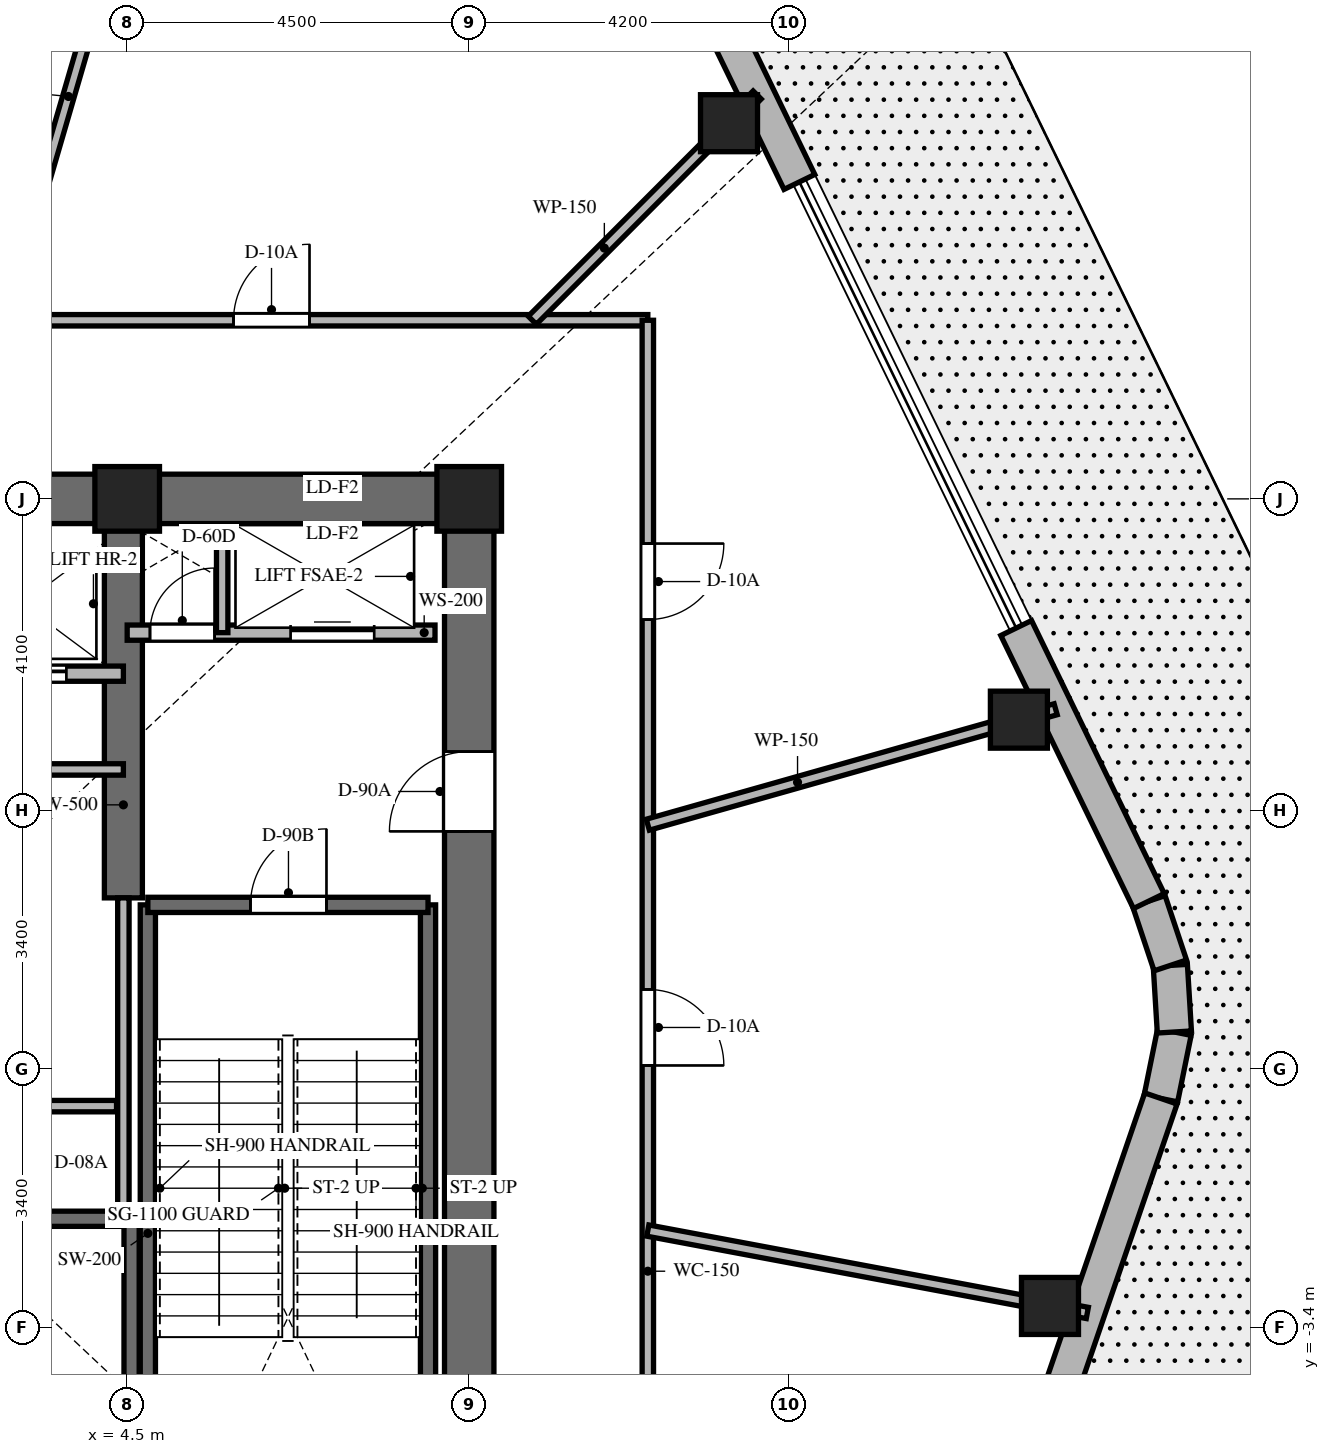
"""IFC4 building model, lengths in metres.
Left out: names, types, materials, properties, quantities, classifications, styles, units other than length and angle.
Written with IfcOpenShell. Run it as: python <this file> out.ifc"""

import sys

from ifc_helpers import new_model, si_unit, direction, frame, frame_2d, origin, origin_2d, place, context, subcontext, project, spatial, rectangle, extrude, element, fill, save


model = new_model("IFC4")
c1 = context("Model", 3, precision=1e-05, world=origin(), true_north=direction((0.0, 1.0)))
c2 = subcontext(c1, "Body", "Model", "MODEL_VIEW")
j1 = project(units=[si_unit("LENGTHUNIT", "METRE"), si_unit("PLANEANGLEUNIT", "RADIAN")], contexts=[c1])
p1 = place(None, origin())
s1 = spatial("IfcSite", under=j1, at=p1, CompositionType="ELEMENT")
p2 = place(p1, origin())
s2 = spatial("IfcBuilding", under=s1, at=p2, CompositionType="ELEMENT")
p3 = place(p2, frame((0.0, 0.0, 305.4)))
s3 = spatial("IfcBuildingStorey", under=s2, at=p3, CompositionType="ELEMENT", Elevation=305.4)
p4 = place(p3, frame((1.85, 7.5, 0.0), z_axis=(0.0, 0.0, 1.0), x_axis=(1.0, 0.0, 0.0)))
e1 = element("IfcWall", 1, at=p4, inside=s3, PredefinedType="SHEAR", context=c2, shape_type="SweptSolid", body=[
    extrude(rectangle(XDim=7.475, YDim=0.65, at=frame_2d((3.737, 0.0))), origin(), (0.0, 0.0, 1.0), 5.0),
])
p5 = place(p3, frame((9.0, -7.175, 0.0), z_axis=(0.0, 0.0, 1.0), x_axis=(0.0, 1.0, 0.0)))
e2 = element("IfcWall", 2, at=p5, inside=s3, PredefinedType="SHEAR", context=c2, shape_type="SweptSolid", body=[
    extrude(rectangle(XDim=14.35, YDim=0.65, at=frame_2d((7.175, 0.0))), origin(), (0.0, 0.0, 1.0), 5.0),
])
p6 = place(p5, frame((10.3, 0.0, 0.0)))
e3 = element("IfcOpeningElement", 3, at=p6, cuts=e2, PredefinedType="OPENING", context=c2, shape_type="SweptSolid", body=[
    extrude(rectangle(XDim=1.05, YDim=2.15, at=frame_2d((0.525, 1.075))), frame((0.0, 0.335, 0.0), z_axis=(0.0, -1.0, 0.0), x_axis=(1.0, 0.0, 0.0)), (0.0, 0.0, 1.0), 0.67),
])
p7 = place(p3, frame((4.45, 2.25, 0.0), z_axis=(0.0, 0.0, 1.0), x_axis=(0.0, 1.0, 0.0)))
e4 = element("IfcWall", 4, at=p7, inside=s3, PredefinedType="SHEAR", context=c2, shape_type="SweptSolid", body=[
    extrude(rectangle(XDim=4.925, YDim=0.5, at=frame_2d((2.462, 0.0))), origin(), (0.0, 0.0, 1.0), 5.0),
])
for number, where, z_axis, x_axis in (
    (5, (4.772, -6.985, 0.0), (0.0, 0.0, 1.0), (0.0, 1.0, 0.0)),
    (6, (8.458, -6.985, 0.0), (0.0, 0.0, 1.0), (0.0, 1.0, 0.0)),
):
    element("IfcWall", number, at=place(p3, frame(where, z_axis=z_axis, x_axis=x_axis)), inside=s3, PredefinedType="SHEAR", context=c2, shape_type="SweptSolid", body=[
        extrude(rectangle(XDim=9.143, YDim=0.2, at=frame_2d((4.572, 0.0))), origin(), (0.0, 0.0, 1.0), 5.0),
    ])
p8 = place(p3, frame((4.772, 2.158, 0.0), z_axis=(0.0, 0.0, 1.0), x_axis=(1.0, 0.0, 0.0)))
e7 = element("IfcWall", 7, at=p8, inside=s3, PredefinedType="SHEAR", context=c2, shape_type="SweptSolid", body=[
    extrude(rectangle(XDim=3.686, YDim=0.2, at=frame_2d((1.843, 0.0))), origin(), (0.0, 0.0, 1.0), 5.0),
])
p9 = place(p8, frame((1.35, 0.0, 0.0)))
e8 = element("IfcOpeningElement", 8, at=p9, cuts=e7, PredefinedType="OPENING", context=c2, shape_type="SweptSolid", body=[
    extrude(rectangle(XDim=1.0, YDim=2.15, at=frame_2d((0.5, 1.075))), frame((0.0, 0.11, 0.0), z_axis=(0.0, -1.0, 0.0), x_axis=(1.0, 0.0, 0.0)), (0.0, 0.0, 1.0), 0.22),
])
p10 = place(p3, frame((-4.608, -1.972, 0.0), z_axis=(0.0, 0.0, 1.0), x_axis=(1.0, 0.0, 0.0)))
e9 = element("IfcWall", 9, at=p10, inside=s3, PredefinedType="SHEAR", context=c2, shape_type="SweptSolid", body=[
    extrude(rectangle(XDim=9.166, YDim=0.2, at=frame_2d((4.583, 0.0))), origin(), (0.0, 0.0, 1.0), 5.0),
])
p11 = place(p3, frame((4.558, -5.658, 0.0), z_axis=(0.0, 0.0, 1.0), x_axis=(0.0, 1.0, 0.0)))
e10 = element("IfcWall", 10, at=p11, inside=s3, PredefinedType="SHEAR", context=c2, shape_type="SweptSolid", body=[
    extrude(rectangle(XDim=3.686, YDim=0.2, at=frame_2d((1.843, 0.0))), origin(), (0.0, 0.0, 1.0), 5.0),
])
for number, where, z_axis, x_axis in (
    (11, (9.0, 7.5, 0.0), (0.0, 0.0, 1.0), (1.0, 0.0, 0.0)),
    (12, (4.5, 7.5, 0.0), (0.0, 0.0, 1.0), (1.0, 0.0, 0.0)),
):
    element("IfcColumn", number, at=place(p3, frame(where, z_axis=z_axis, x_axis=x_axis)), inside=s3, PredefinedType="COLUMN", context=c2, shape_type="SweptSolid", body=[
        extrude(rectangle(XDim=0.85, YDim=0.85, at=origin_2d()), origin(), (0.0, 0.0, 1.0), 5.0),
    ])
for number, where, z_axis, x_axis in (
    (13, (16.641, -3.119, 0.0), (0.0, 0.0, 1.0), (1.0, 0.0, 0.0)),
    (14, (16.232, 4.595, 0.0), (0.0, 0.0, 1.0), (1.0, 0.0, 0.0)),
    (15, (12.418, 12.443, 0.0), (0.0, 0.0, 1.0), (1.0, 0.0, 0.0)),
):
    element("IfcColumn", number, at=place(p3, frame(where, z_axis=z_axis, x_axis=x_axis)), inside=s3, PredefinedType="COLUMN", context=c2, shape_type="SweptSolid", body=[
        extrude(rectangle(XDim=0.75, YDim=0.75, at=origin_2d()), origin(), (0.0, 0.0, 1.0), 5.0),
    ])
p12 = place(p3, frame((18.1, -0.389, 0.0), z_axis=(0.0, 0.0, 1.0), x_axis=(0.198587865476, 0.980083088154, 0.0)))
e16 = element("IfcWall", 16, at=p12, inside=s3, PredefinedType="SOLIDWALL", context=c2, shape_type="SweptSolid", body=[
    extrude(rectangle(XDim=0.893, YDim=0.45, at=frame_2d((0.446, 0.0))), origin(), (0.0, 0.0, 1.0), 4.68),
])
p13 = place(p3, frame((18.278, 0.486, 0.0), z_axis=(0.0, 0.0, 1.0), x_axis=(-0.060923410031, 0.998142443798, 0.0)))
e17 = element("IfcWall", 17, at=p13, inside=s3, PredefinedType="SOLIDWALL", context=c2, shape_type="SweptSolid", body=[
    extrude(rectangle(XDim=0.878, YDim=0.45, at=frame_2d((0.439, 0.0))), origin(), (0.0, 0.0, 1.0), 4.68),
])
p14 = place(p3, frame((18.224, 1.362, 0.0), z_axis=(0.0, 0.0, 1.0), x_axis=(-0.316227766017, 0.948683298051, 0.0)))
e18 = element("IfcWall", 18, at=p14, inside=s3, PredefinedType="SOLIDWALL", context=c2, shape_type="SweptSolid", body=[
    extrude(rectangle(XDim=0.893, YDim=0.45, at=frame_2d((0.446, 0.0))), origin(), (0.0, 0.0, 1.0), 4.68),
])
p15 = place(p3, frame((16.752, -4.32, 0.0), z_axis=(0.0, 0.0, 1.0), x_axis=(0.324516563827, 0.945880013428, 0.0)))
e19 = element("IfcWall", 19, at=p15, inside=s3, PredefinedType="SOLIDWALL", context=c2, shape_type="SweptSolid", body=[
    extrude(rectangle(XDim=4.156, YDim=0.45, at=frame_2d((2.078, 0.0))), origin(), (0.0, 0.0, 1.0), 4.68),
])
p16 = place(p3, frame((17.942, 2.208, 0.0), z_axis=(0.0, 0.0, 1.0), x_axis=(-0.437062225544, 0.899431270861, 0.0)))
e20 = element("IfcWall", 20, at=p16, inside=s3, PredefinedType="SOLIDWALL", context=c2, shape_type="SweptSolid", body=[
    extrude(rectangle(XDim=3.994, YDim=0.45, at=frame_2d((1.997, 0.0))), origin(), (0.0, 0.0, 1.0), 4.68),
])
p17 = place(p3, frame((13.344, 11.67, 0.0), z_axis=(0.0, 0.0, 1.0), x_axis=(-0.437044105444, 0.899440075768, 0.0)))
e21 = element("IfcWall", 21, at=p17, inside=s3, PredefinedType="SOLIDWALL", context=c2, shape_type="SweptSolid", body=[
    extrude(rectangle(XDim=3.987, YDim=0.45, at=frame_2d((1.993, 0.0))), origin(), (0.0, 0.0, 1.0), 4.68),
])
p18 = place(p3, frame((4.5, 5.74, 0.0), z_axis=(0.0, 0.0, 1.0), x_axis=(1.0, 0.0, 0.0)))
e22 = element("IfcWall", 22, at=p18, inside=s3, PredefinedType="PARTITIONING", context=c2, shape_type="SweptSolid", body=[
    extrude(rectangle(XDim=4.05, YDim=0.2, at=frame_2d((2.025, 0.0))), origin(), (0.0, 0.0, 1.0), 4.68),
])
p19 = place(p18, frame((0.3, 0.0, 0.0)))
e23 = element("IfcOpeningElement", 23, at=p19, cuts=e22, PredefinedType="OPENING", context=c2, shape_type="SweptSolid", body=[
    extrude(rectangle(XDim=0.85, YDim=2.03, at=frame_2d((0.425, 1.015))), frame((0.0, 0.11, 0.0), z_axis=(0.0, -1.0, 0.0), x_axis=(1.0, 0.0, 0.0)), (0.0, 0.0, 1.0), 0.22),
])
p20 = place(p18, frame((2.15, 0.0, 0.0)))
e24 = element("IfcOpeningElement", 24, at=p20, cuts=e22, PredefinedType="OPENING", context=c2, shape_type="SweptSolid", body=[
    extrude(rectangle(XDim=1.1, YDim=2.2, at=frame_2d((0.55, 1.1))), frame((0.0, 0.11, 0.0), z_axis=(0.0, -1.0, 0.0), x_axis=(1.0, 0.0, 0.0)), (0.0, 0.0, 1.0), 0.22),
])
p21 = place(p3, frame((5.75, 5.74, 0.0), z_axis=(0.0, 0.0, 1.0), x_axis=(0.0, 1.0, 0.0)))
e25 = element("IfcWall", 25, at=p21, inside=s3, PredefinedType="PARTITIONING", context=c2, shape_type="SweptSolid", body=[
    extrude(rectangle(XDim=1.41, YDim=0.15, at=frame_2d((0.705, 0.0))), origin(), (0.0, 0.0, 1.0), 4.68),
])
p22 = place(p3, frame((1.85, 5.2, 0.0), z_axis=(0.0, 0.0, 1.0), x_axis=(1.0, 0.0, 0.0)))
e26 = element("IfcWall", 26, at=p22, inside=s3, PredefinedType="PARTITIONING", context=c2, shape_type="SweptSolid", body=[
    extrude(rectangle(XDim=2.6, YDim=0.2, at=frame_2d((1.3, 0.0))), origin(), (0.0, 0.0, 1.0), 4.68),
])
p23 = place(p22, frame((0.75, 0.0, 0.0)))
e27 = element("IfcOpeningElement", 27, at=p23, cuts=e26, PredefinedType="OPENING", context=c2, shape_type="SweptSolid", body=[
    extrude(rectangle(XDim=1.1, YDim=2.2, at=frame_2d((0.55, 1.1))), frame((0.0, 0.11, 0.0), z_axis=(0.0, -1.0, 0.0), x_axis=(1.0, 0.0, 0.0)), (0.0, 0.0, 1.0), 0.22),
])
p24 = place(p3, frame((4.45, -1.972, 0.0), z_axis=(0.0, 0.0, 1.0), x_axis=(0.0, 1.0, 0.0)))
e28 = element("IfcWall", 28, at=p24, inside=s3, PredefinedType="PARTITIONING", context=c2, shape_type="SweptSolid", body=[
    extrude(rectangle(XDim=4.222, YDim=0.15, at=frame_2d((2.111, 0.0))), origin(), (0.0, 0.0, 1.0), 4.68),
])
p25 = place(p3, frame((1.9, 3.94, 0.0), z_axis=(0.0, 0.0, 1.0), x_axis=(1.0, 0.0, 0.0)))
e29 = element("IfcWall", 29, at=p25, inside=s3, PredefinedType="PARTITIONING", context=c2, shape_type="SweptSolid", body=[
    extrude(rectangle(XDim=2.55, YDim=0.15, at=frame_2d((1.275, 0.0))), origin(), (0.0, 0.0, 1.0), 4.68),
])
p26 = place(p3, frame((-4.36, -0.49, 0.0), z_axis=(0.0, 0.0, 1.0), x_axis=(1.0, 0.0, 0.0)))
e30 = element("IfcWall", 30, at=p26, inside=s3, PredefinedType="PARTITIONING", context=c2, shape_type="SweptSolid", body=[
    extrude(rectangle(XDim=8.72, YDim=0.15, at=frame_2d((4.36, 0.0))), origin(), (0.0, 0.0, 1.0), 4.68),
])
p27 = place(p26, frame((2.81, 0.0, 0.0)))
e31 = element("IfcOpeningElement", 31, at=p27, cuts=e30, PredefinedType="OPENING", context=c2, shape_type="SweptSolid", body=[
    extrude(rectangle(XDim=0.85, YDim=2.03, at=frame_2d((0.425, 1.015))), frame((0.0, 0.085, 0.0), z_axis=(0.0, -1.0, 0.0), x_axis=(1.0, 0.0, 0.0)), (0.0, 0.0, 1.0), 0.17),
])
p28 = place(p26, frame((4.61, 0.0, 0.0)))
e32 = element("IfcOpeningElement", 32, at=p28, cuts=e30, PredefinedType="OPENING", context=c2, shape_type="SweptSolid", body=[
    extrude(rectangle(XDim=0.85, YDim=2.03, at=frame_2d((0.425, 1.015))), frame((0.0, 0.085, 0.0), z_axis=(0.0, -1.0, 0.0), x_axis=(1.0, 0.0, 0.0)), (0.0, 0.0, 1.0), 0.17),
])
p29 = place(p3, frame((-11.35, 9.85, 0.0), z_axis=(0.0, 0.0, 1.0), x_axis=(1.0, 0.0, 0.0)))
e33 = element("IfcWall", 33, at=p29, inside=s3, PredefinedType="PARTITIONING", context=c2, shape_type="SweptSolid", body=[
    extrude(rectangle(XDim=22.7, YDim=0.15, at=frame_2d((11.35, 0.0))), origin(), (0.0, 0.0, 1.0), 2.87),
])
p30 = place(p29, frame((17.249, 0.0, 0.0)))
e34 = element("IfcOpeningElement", 34, at=p30, cuts=e33, PredefinedType="OPENING", context=c2, shape_type="SweptSolid", body=[
    extrude(rectangle(XDim=1.0, YDim=2.03, at=frame_2d((0.5, 1.015))), frame((0.0, 0.085, 0.0), z_axis=(0.0, -1.0, 0.0), x_axis=(1.0, 0.0, 0.0)), (0.0, 0.0, 1.0), 0.17),
])
p31 = place(p29, frame((10.441, 0.0, 0.0)))
e35 = element("IfcOpeningElement", 35, at=p31, cuts=e33, PredefinedType="OPENING", context=c2, shape_type="SweptSolid", body=[
    extrude(rectangle(XDim=1.0, YDim=2.03, at=frame_2d((0.5, 1.015))), frame((0.0, 0.085, 0.0), z_axis=(0.0, -1.0, 0.0), x_axis=(1.0, 0.0, 0.0)), (0.0, 0.0, 1.0), 0.17),
])
p32 = place(p29, frame((3.454, 0.0, 0.0)))
e36 = element("IfcOpeningElement", 36, at=p32, cuts=e33, PredefinedType="OPENING", context=c2, shape_type="SweptSolid", body=[
    extrude(rectangle(XDim=1.0, YDim=2.03, at=frame_2d((0.5, 1.015))), frame((0.0, 0.085, 0.0), z_axis=(0.0, -1.0, 0.0), x_axis=(1.0, 0.0, 0.0)), (0.0, 0.0, 1.0), 0.17),
])
p33 = place(p3, frame((11.35, 9.85, 0.0), z_axis=(0.0, 0.0, 1.0), x_axis=(0.0, -1.0, 0.0)))
e37 = element("IfcWall", 37, at=p33, inside=s3, PredefinedType="PARTITIONING", context=c2, shape_type="SweptSolid", body=[
    extrude(rectangle(XDim=19.7, YDim=0.15, at=frame_2d((9.85, 0.0))), origin(), (0.0, 0.0, 1.0), 2.87),
])
p34 = place(p33, frame((2.938, 0.0, 0.0)))
e38 = element("IfcOpeningElement", 38, at=p34, cuts=e37, PredefinedType="OPENING", context=c2, shape_type="SweptSolid", body=[
    extrude(rectangle(XDim=1.0, YDim=2.03, at=frame_2d((0.5, 1.015))), frame((0.0, 0.085, 0.0), z_axis=(0.0, -1.0, 0.0), x_axis=(1.0, 0.0, 0.0)), (0.0, 0.0, 1.0), 0.17),
])
p35 = place(p33, frame((15.219, 0.0, 0.0)))
e39 = element("IfcOpeningElement", 39, at=p35, cuts=e37, PredefinedType="OPENING", context=c2, shape_type="SweptSolid", body=[
    extrude(rectangle(XDim=1.0, YDim=2.03, at=frame_2d((0.5, 1.015))), frame((0.0, 0.085, 0.0), z_axis=(0.0, -1.0, 0.0), x_axis=(1.0, 0.0, 0.0)), (0.0, 0.0, 1.0), 0.17),
])
p36 = place(p33, frame((8.805, 0.0, 0.0)))
e40 = element("IfcOpeningElement", 40, at=p36, cuts=e37, PredefinedType="OPENING", context=c2, shape_type="SweptSolid", body=[
    extrude(rectangle(XDim=1.0, YDim=2.03, at=frame_2d((0.5, 1.015))), frame((0.0, 0.085, 0.0), z_axis=(0.0, -1.0, 0.0), x_axis=(1.0, 0.0, 0.0)), (0.0, 0.0, 1.0), 0.17),
])
p37 = place(p3, frame((11.35, 3.213, 0.0), z_axis=(0.0, 0.0, 1.0), x_axis=(0.962182015747, 0.272407357782, 0.0)))
e41 = element("IfcWall", 41, at=p37, inside=s3, PredefinedType="PARTITIONING", context=c2, shape_type="SweptSolid", body=[
    extrude(rectangle(XDim=5.576, YDim=0.15, at=frame_2d((2.788, 0.0))), origin(), (0.0, 0.0, 1.0), 2.87),
])
p38 = place(p3, frame((9.83, 9.85, 0.0), z_axis=(0.0, 0.0, 1.0), x_axis=(0.706435999186, 0.707776927467, 0.0)))
e42 = element("IfcWall", 42, at=p38, inside=s3, PredefinedType="PARTITIONING", context=c2, shape_type="SweptSolid", body=[
    extrude(rectangle(XDim=4.188, YDim=0.15, at=frame_2d((2.094, 0.0))), origin(), (0.0, 0.0, 1.0), 2.87),
])
p39 = place(p3, frame((2.869, 9.85, 0.0), z_axis=(0.0, 0.0, 1.0), x_axis=(0.279679268414, 0.960093488583, 0.0)))
e43 = element("IfcWall", 43, at=p39, inside=s3, PredefinedType="PARTITIONING", context=c2, shape_type="SweptSolid", body=[
    extrude(rectangle(XDim=7.629, YDim=0.15, at=frame_2d((3.815, 0.0))), origin(), (0.0, 0.0, 1.0), 2.87),
])
p40 = place(p3, frame((11.35, -2.127, 0.0), z_axis=(0.0, 0.0, 1.0), x_axis=(0.982876415115, -0.184265983326, 0.0)))
e44 = element("IfcWall", 44, at=p40, inside=s3, PredefinedType="PARTITIONING", context=c2, shape_type="SweptSolid", body=[
    extrude(rectangle(XDim=5.883, YDim=0.15, at=frame_2d((2.941, 0.0))), origin(), (0.0, 0.0, 1.0), 2.87),
])
p41 = place(p9, origin())
e45 = element("IfcDoor", 45, at=p41, inside=s3, OperationType="SINGLE_SWING_RIGHT", PredefinedType="DOOR", context=c2, shape_type="SweptSolid", body=[
    extrude(rectangle(XDim=1.0, YDim=2.15, at=frame_2d((0.5, 1.075))), frame((0.0, 0.025, 0.0), z_axis=(0.0, -1.0, 0.0), x_axis=(1.0, 0.0, 0.0)), (0.0, 0.0, 1.0), 0.05),
])
fill(e8, e45)
p42 = place(p6, origin())
e46 = element("IfcDoor", 46, at=p42, inside=s3, OperationType="SINGLE_SWING_LEFT", PredefinedType="DOOR", context=c2, shape_type="SweptSolid", body=[
    extrude(rectangle(XDim=1.05, YDim=2.15, at=frame_2d((0.525, 1.075))), frame((0.0, 0.025, 0.0), z_axis=(0.0, -1.0, 0.0), x_axis=(1.0, 0.0, 0.0)), (0.0, 0.0, 1.0), 0.05),
])
fill(e3, e46)
p43 = place(p19, origin())
e47 = element("IfcDoor", 47, at=p43, inside=s3, OperationType="SINGLE_SWING_RIGHT", PredefinedType="DOOR", context=c2, shape_type="SweptSolid", body=[
    extrude(rectangle(XDim=0.85, YDim=2.03, at=frame_2d((0.425, 1.015))), frame((0.0, 0.025, 0.0), z_axis=(0.0, -1.0, 0.0), x_axis=(1.0, 0.0, 0.0)), (0.0, 0.0, 1.0), 0.05),
])
fill(e23, e47)
p44 = place(p20, origin())
e48 = element("IfcDoor", 48, at=p44, inside=s3, OperationType="SLIDING_TO_RIGHT", PredefinedType="DOOR", context=c2, shape_type="SweptSolid", body=[
    extrude(rectangle(XDim=1.1, YDim=2.2, at=frame_2d((0.55, 1.1))), frame((0.0, 0.025, 0.0), z_axis=(0.0, -1.0, 0.0), x_axis=(1.0, 0.0, 0.0)), (0.0, 0.0, 1.0), 0.05),
])
fill(e24, e48)
p45 = place(p23, origin())
e49 = element("IfcDoor", 49, at=p45, inside=s3, OperationType="SLIDING_TO_RIGHT", PredefinedType="DOOR", context=c2, shape_type="SweptSolid", body=[
    extrude(rectangle(XDim=1.1, YDim=2.2, at=frame_2d((0.55, 1.1))), frame((0.0, 0.025, 0.0), z_axis=(0.0, -1.0, 0.0), x_axis=(1.0, 0.0, 0.0)), (0.0, 0.0, 1.0), 0.05),
])
fill(e27, e49)
p46 = place(p34, origin())
e50 = element("IfcDoor", 50, at=p46, inside=s3, OperationType="SINGLE_SWING_LEFT", PredefinedType="DOOR", context=c2, shape_type="SweptSolid", body=[
    extrude(rectangle(XDim=1.0, YDim=2.03, at=frame_2d((0.5, 1.015))), frame((0.0, 0.025, 0.0), z_axis=(0.0, -1.0, 0.0), x_axis=(1.0, 0.0, 0.0)), (0.0, 0.0, 1.0), 0.05),
])
fill(e38, e50)
p47 = place(p30, origin())
e51 = element("IfcDoor", 51, at=p47, inside=s3, OperationType="SINGLE_SWING_RIGHT", PredefinedType="DOOR", context=c2, shape_type="SweptSolid", body=[
    extrude(rectangle(XDim=1.0, YDim=2.03, at=frame_2d((0.5, 1.015))), frame((0.0, 0.025, 0.0), z_axis=(0.0, -1.0, 0.0), x_axis=(1.0, 0.0, 0.0)), (0.0, 0.0, 1.0), 0.05),
])
fill(e34, e51)
p48 = place(p36, origin())
e52 = element("IfcDoor", 52, at=p48, inside=s3, OperationType="SINGLE_SWING_RIGHT", PredefinedType="DOOR", context=c2, shape_type="SweptSolid", body=[
    extrude(rectangle(XDim=1.0, YDim=2.03, at=frame_2d((0.5, 1.015))), frame((0.0, 0.025, 0.0), z_axis=(0.0, -1.0, 0.0), x_axis=(1.0, 0.0, 0.0)), (0.0, 0.0, 1.0), 0.05),
])
fill(e40, e52)
save(model, sys.argv[1])
